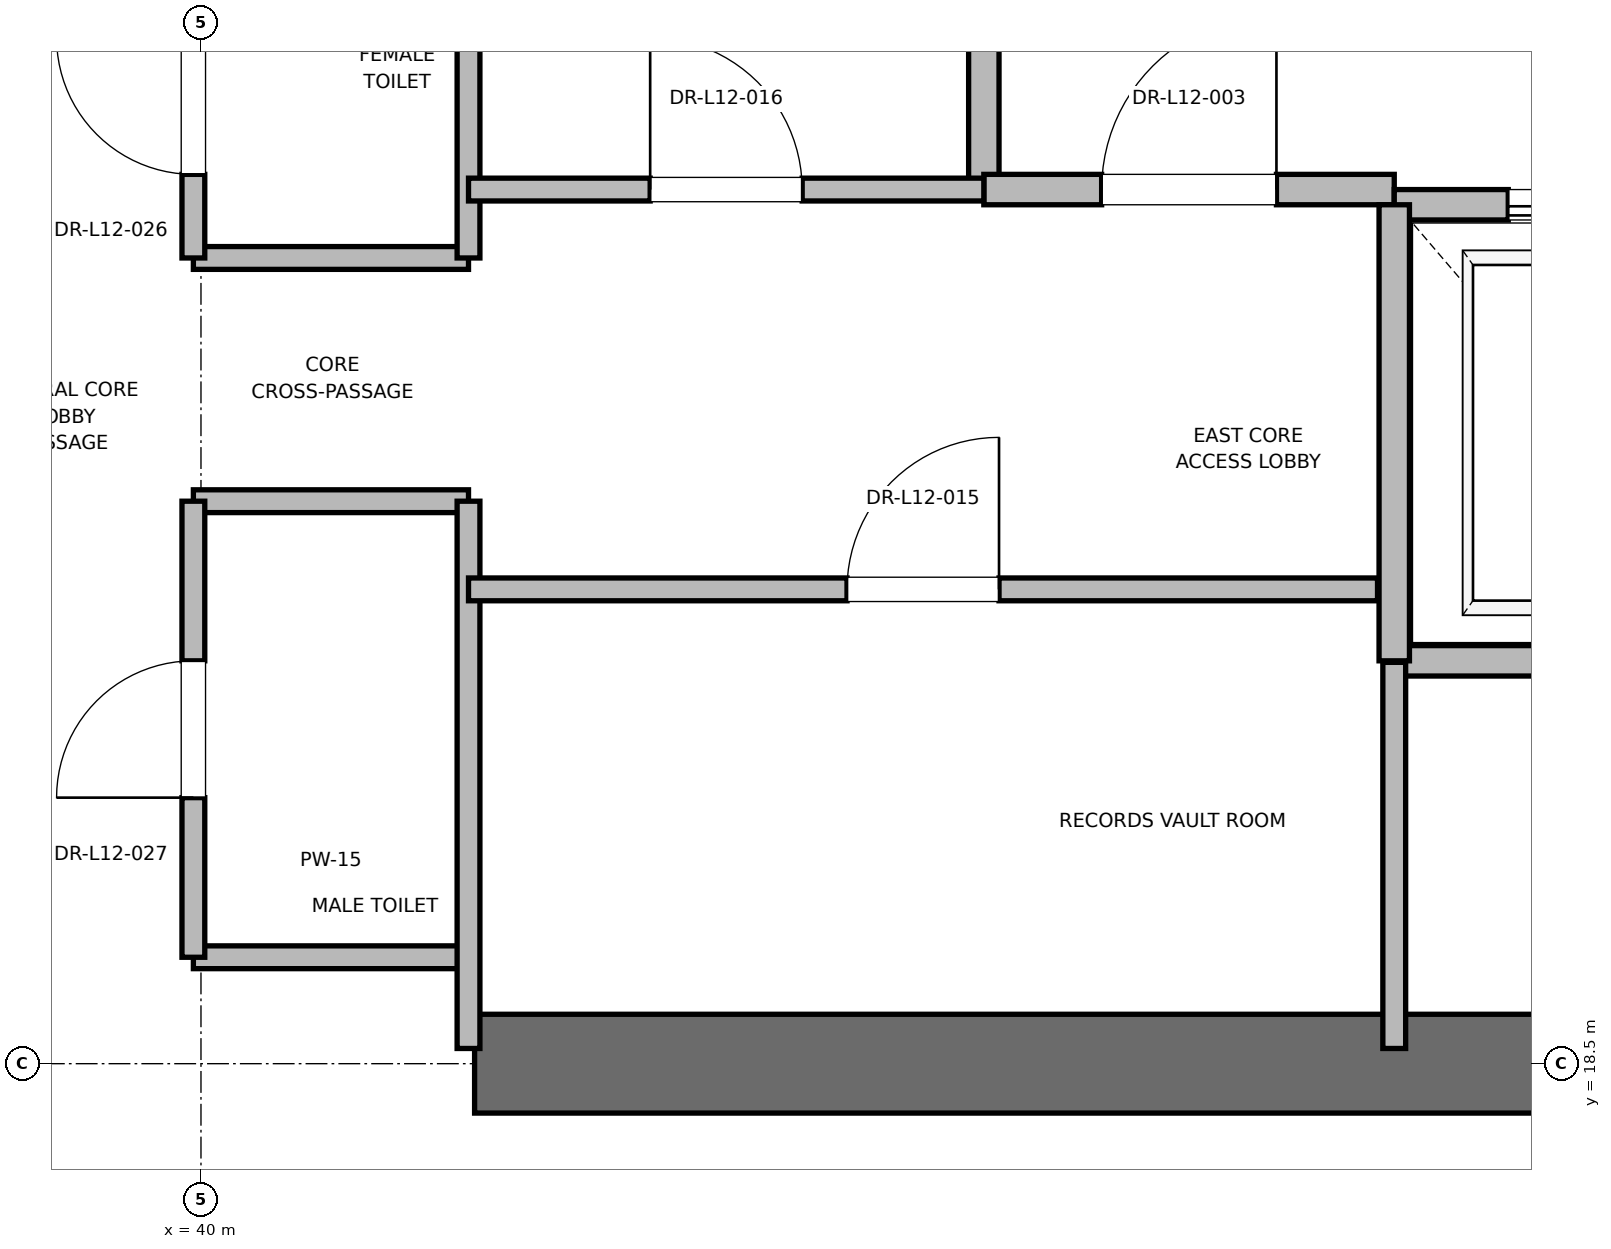
"""IFC4 building model, lengths in metres.
Left out: names, types, materials, properties, quantities, classifications, styles, units other than length and angle.
Written with IfcOpenShell. Run it as: python <this file> out.ifc"""

import sys

from ifc_helpers import new_model, si_unit, direction, frame, frame_2d, origin, place, context, subcontext, project, spatial, rectangle, extrude, element, fill, save


model = new_model("IFC4")
c1 = context("Model", 3, precision=1e-05, world=origin(), true_north=direction((0.0, 1.0)))
c2 = subcontext(c1, "Body", "Model", "MODEL_VIEW")
j1 = project(units=[si_unit("LENGTHUNIT", "METRE"), si_unit("PLANEANGLEUNIT", "RADIAN")], contexts=[c1])
p1 = place(None, origin())
s1 = spatial("IfcSite", under=j1, at=p1, CompositionType="ELEMENT")
p2 = place(p1, origin())
s2 = spatial("IfcBuilding", under=s1, at=p2, CompositionType="ELEMENT")
p3 = place(p2, frame((0.0, 0.0, 55.6)))
s3 = spatial("IfcBuildingStorey", under=s2, at=p3, CompositionType="ELEMENT", Elevation=55.6)
p4 = place(p3, frame((41.8, 18.5, 0.0), z_axis=(0.0, 0.0, 1.0), x_axis=(1.0, 0.0, 0.0)))
e1 = element("IfcWall", 1, at=p4, inside=s3, PredefinedType="SHEAR", context=c2, shape_type="SweptSolid", body=[
    extrude(rectangle(XDim=9.2, YDim=0.65, at=frame_2d((4.6, 0.0))), origin(), (0.0, 0.0, 1.0), 3.76),
])
p5 = place(p3, frame((45.15, 24.25, 0.0), z_axis=(0.0, 0.0, 1.0), x_axis=(0.0, 1.0, 0.0)))
e2 = element("IfcWall", 2, at=p5, inside=s3, PredefinedType="PARTITIONING", context=c2, shape_type="SweptSolid", body=[
    extrude(rectangle(XDim=3.37, YDim=0.2, at=frame_2d((1.685, 0.0))), origin(), (0.0, 0.0, 1.0), 3.76),
])
p6 = place(p3, frame((45.15, 24.25, 0.0), z_axis=(0.0, 0.0, 1.0), x_axis=(1.0, 0.0, 0.0)))
e3 = element("IfcWall", 3, at=p6, inside=s3, PredefinedType="PARTITIONING", context=c2, shape_type="SweptSolid", body=[
    extrude(rectangle(XDim=2.7, YDim=0.2, at=frame_2d((1.35, 0.0))), origin(), (0.0, 0.0, 1.0), 3.76),
])
p7 = place(p6, frame((0.775, 0.0, 0.0)))
e4 = element("IfcOpeningElement", 4, at=p7, cuts=e3, PredefinedType="OPENING", context=c2, shape_type="SweptSolid", body=[
    extrude(rectangle(XDim=1.15, YDim=2.2, at=frame_2d((0.575, 1.1))), frame((0.0, 0.1, 0.0), z_axis=(0.0, -1.0, 0.0), x_axis=(1.0, 0.0, 0.0)), (0.0, 0.0, 1.0), 0.2),
])
p8 = place(p3, frame((47.85, 21.15, 0.0), z_axis=(0.0, 0.0, 1.0), x_axis=(1.0, 0.0, 0.0)))
e5 = element("IfcWall", 5, at=p8, inside=s3, PredefinedType="SOLIDWALL", context=c2, shape_type="SweptSolid", body=[
    extrude(rectangle(XDim=2.6, YDim=0.2, at=frame_2d((1.3, 0.0))), origin(), (0.0, 0.0, 1.0), 3.76),
])
p9 = place(p3, frame((50.45, 24.15, 0.0), z_axis=(0.0, 0.0, 1.0), x_axis=(-1.0, 0.0, 0.0)))
e6 = element("IfcWall", 6, at=p9, inside=s3, PredefinedType="SOLIDWALL", context=c2, shape_type="SweptSolid", body=[
    extrude(rectangle(XDim=2.6, YDim=0.2, at=frame_2d((1.3, 0.0))), origin(), (0.0, 0.0, 1.0), 2.54),
])
p10 = place(p9, frame((0.75, 0.0, 0.0)))
e7 = element("IfcOpeningElement", 7, at=p10, cuts=e6, PredefinedType="OPENING", context=c2, shape_type="SweptSolid", body=[
    extrude(rectangle(XDim=1.1, YDim=2.2, at=frame_2d((0.55, 1.1))), frame((0.0, 0.1, 0.0), z_axis=(0.0, -1.0, 0.0), x_axis=(1.0, 0.0, 0.0)), (0.0, 0.0, 1.0), 0.2),
])
p11 = place(p3, frame((47.85, 24.15, 0.0), z_axis=(0.0, 0.0, 1.0), x_axis=(0.0, -1.0, 0.0)))
e8 = element("IfcWall", 8, at=p11, inside=s3, PredefinedType="SOLIDWALL", context=c2, shape_type="SweptSolid", body=[
    extrude(rectangle(XDim=3.0, YDim=0.2, at=frame_2d((1.5, 0.0))), origin(), (0.0, 0.0, 1.0), 3.76),
])
for number, where, z_axis, x_axis in (
    (9, (39.95, 19.2, 0.0), (0.0, 0.0, 1.0), (1.0, 0.0, 0.0)),
    (10, (39.95, 22.2, 0.0), (0.0, 0.0, 1.0), (1.0, 0.0, 0.0)),
    (11, (39.95, 23.8, 0.0), (0.0, 0.0, 1.0), (1.0, 0.0, 0.0)),
):
    element("IfcWall", number, at=place(p3, frame(where, z_axis=z_axis, x_axis=x_axis)), inside=s3, PredefinedType="PARTITIONING", context=c2, shape_type="SweptSolid", body=[
        extrude(rectangle(XDim=1.81, YDim=0.15, at=frame_2d((0.905, 0.0))), origin(), (0.0, 0.0, 1.0), 2.85),
    ])
p12 = place(p3, frame((41.76, 18.6, 0.0), z_axis=(0.0, 0.0, 1.0), x_axis=(0.0, 1.0, 0.0)))
e12 = element("IfcWall", 12, at=p12, inside=s3, PredefinedType="PARTITIONING", context=c2, shape_type="SweptSolid", body=[
    extrude(rectangle(XDim=3.6, YDim=0.15, at=frame_2d((1.8, 0.0))), origin(), (0.0, 0.0, 1.0), 2.54),
])
p13 = place(p3, frame((41.76, 23.8, 0.0), z_axis=(0.0, 0.0, 1.0), x_axis=(0.0, 1.0, 0.0)))
e13 = element("IfcWall", 13, at=p13, inside=s3, PredefinedType="PARTITIONING", context=c2, shape_type="SweptSolid", body=[
    extrude(rectangle(XDim=4.0, YDim=0.15, at=frame_2d((2.0, 0.0))), origin(), (0.0, 0.0, 1.0), 2.85),
])
p14 = place(p3, frame((39.95, 19.2, 0.0), z_axis=(0.0, 0.0, 1.0), x_axis=(0.0, 1.0, 0.0)))
e14 = element("IfcWall", 14, at=p14, inside=s3, PredefinedType="PARTITIONING", context=c2, shape_type="SweptSolid", body=[
    extrude(rectangle(XDim=3.0, YDim=0.15, at=frame_2d((1.5, 0.0))), origin(), (0.0, 0.0, 1.0), 2.85),
])
p15 = place(p14, frame((1.05, 0.0, 0.0)))
e15 = element("IfcOpeningElement", 15, at=p15, cuts=e14, PredefinedType="OPENING", context=c2, shape_type="SweptSolid", body=[
    extrude(rectangle(XDim=0.9, YDim=2.1, at=frame_2d((0.45, 1.05))), frame((0.0, 0.075, 0.0), z_axis=(0.0, -1.0, 0.0), x_axis=(1.0, 0.0, 0.0)), (0.0, 0.0, 1.0), 0.15),
])
p16 = place(p3, frame((39.95, 23.8, 0.0), z_axis=(0.0, 0.0, 1.0), x_axis=(0.0, 1.0, 0.0)))
e16 = element("IfcWall", 16, at=p16, inside=s3, PredefinedType="PARTITIONING", context=c2, shape_type="SweptSolid", body=[
    extrude(rectangle(XDim=2.0, YDim=0.15, at=frame_2d((1.0, 0.0))), origin(), (0.0, 0.0, 1.0), 2.85),
])
p17 = place(p16, frame((0.55, 0.0, 0.0)))
e17 = element("IfcOpeningElement", 17, at=p17, cuts=e16, PredefinedType="OPENING", context=c2, shape_type="SweptSolid", body=[
    extrude(rectangle(XDim=0.9, YDim=2.1, at=frame_2d((0.45, 1.05))), frame((0.0, 0.075, 0.0), z_axis=(0.0, -1.0, 0.0), x_axis=(1.0, 0.0, 0.0)), (0.0, 0.0, 1.0), 0.15),
])
p18 = place(p3, frame((47.85, 18.6, 0.0), z_axis=(0.0, 0.0, 1.0), x_axis=(0.0, 1.0, 0.0)))
e18 = element("IfcWall", 18, at=p18, inside=s3, PredefinedType="PARTITIONING", context=c2, shape_type="SweptSolid", body=[
    extrude(rectangle(XDim=2.54, YDim=0.15, at=frame_2d((1.27, 0.0))), origin(), (0.0, 0.0, 1.0), 2.85),
])
p19 = place(p3, frame((41.76, 21.62, 0.0), z_axis=(0.0, 0.0, 1.0), x_axis=(1.0, 0.0, 0.0)))
e19 = element("IfcWall", 19, at=p19, inside=s3, PredefinedType="PARTITIONING", context=c2, shape_type="SweptSolid", body=[
    extrude(rectangle(XDim=5.98, YDim=0.15, at=frame_2d((2.99, 0.0))), origin(), (0.0, 0.0, 1.0), 2.85),
])
p20 = place(p19, frame((2.49, 0.0, 0.0)))
e20 = element("IfcOpeningElement", 20, at=p20, cuts=e19, PredefinedType="OPENING", context=c2, shape_type="SweptSolid", body=[
    extrude(rectangle(XDim=1.0, YDim=2.15, at=frame_2d((0.5, 1.075))), frame((0.0, 0.075, 0.0), z_axis=(0.0, -1.0, 0.0), x_axis=(1.0, 0.0, 0.0)), (0.0, 0.0, 1.0), 0.15),
])
p21 = place(p3, frame((41.76, 24.25, 0.0), z_axis=(0.0, 0.0, 1.0), x_axis=(1.0, 0.0, 0.0)))
e21 = element("IfcWall", 21, at=p21, inside=s3, PredefinedType="PARTITIONING", context=c2, shape_type="SweptSolid", body=[
    extrude(rectangle(XDim=3.39, YDim=0.15, at=frame_2d((1.695, 0.0))), origin(), (0.0, 0.0, 1.0), 2.85),
])
p22 = place(p21, frame((1.195, 0.0, 0.0)))
e22 = element("IfcOpeningElement", 22, at=p22, cuts=e21, PredefinedType="OPENING", context=c2, shape_type="SweptSolid", body=[
    extrude(rectangle(XDim=1.0, YDim=2.15, at=frame_2d((0.5, 1.075))), frame((0.0, 0.075, 0.0), z_axis=(0.0, -1.0, 0.0), x_axis=(1.0, 0.0, 0.0)), (0.0, 0.0, 1.0), 0.15),
])
p23 = place(p7, origin())
e23 = element("IfcDoor", 23, at=p23, inside=s3, OperationType="SINGLE_SWING_RIGHT", PredefinedType="DOOR", context=c2, shape_type="SweptSolid", body=[
    extrude(rectangle(XDim=1.15, YDim=2.2, at=frame_2d((0.575, 1.1))), frame((0.0, 0.025, 0.0), z_axis=(0.0, -1.0, 0.0), x_axis=(1.0, 0.0, 0.0)), (0.0, 0.0, 1.0), 0.05),
])
fill(e4, e23)
p24 = place(p10, origin())
e24 = element("IfcDoor", 24, at=p24, inside=s3, OperationType="SLIDING_TO_RIGHT", PredefinedType="DOOR", context=c2, shape_type="SweptSolid", body=[
    extrude(rectangle(XDim=1.1, YDim=2.2, at=frame_2d((0.55, 1.1))), frame((0.0, 0.025, 0.0), z_axis=(0.0, -1.0, 0.0), x_axis=(1.0, 0.0, 0.0)), (0.0, 0.0, 1.0), 0.05),
])
fill(e7, e24)
p25 = place(p15, origin())
e25 = element("IfcDoor", 25, at=p25, inside=s3, OperationType="SINGLE_SWING_LEFT", PredefinedType="DOOR", context=c2, shape_type="SweptSolid", body=[
    extrude(rectangle(XDim=0.9, YDim=2.1, at=frame_2d((0.45, 1.05))), frame((0.0, 0.025, 0.0), z_axis=(0.0, -1.0, 0.0), x_axis=(1.0, 0.0, 0.0)), (0.0, 0.0, 1.0), 0.05),
])
fill(e15, e25)
p26 = place(p17, origin())
e26 = element("IfcDoor", 26, at=p26, inside=s3, OperationType="SINGLE_SWING_RIGHT", PredefinedType="DOOR", context=c2, shape_type="SweptSolid", body=[
    extrude(rectangle(XDim=0.9, YDim=2.1, at=frame_2d((0.45, 1.05))), frame((0.0, 0.025, 0.0), z_axis=(0.0, -1.0, 0.0), x_axis=(1.0, 0.0, 0.0)), (0.0, 0.0, 1.0), 0.05),
])
fill(e17, e26)
p27 = place(p20, origin())
e27 = element("IfcDoor", 27, at=p27, inside=s3, OperationType="SINGLE_SWING_RIGHT", PredefinedType="DOOR", context=c2, shape_type="SweptSolid", body=[
    extrude(rectangle(XDim=1.0, YDim=2.15, at=frame_2d((0.5, 1.075))), frame((0.0, 0.025, 0.0), z_axis=(0.0, -1.0, 0.0), x_axis=(1.0, 0.0, 0.0)), (0.0, 0.0, 1.0), 0.05),
])
fill(e20, e27)
p28 = place(p22, origin())
e28 = element("IfcDoor", 28, at=p28, inside=s3, OperationType="SINGLE_SWING_LEFT", PredefinedType="DOOR", context=c2, shape_type="SweptSolid", body=[
    extrude(rectangle(XDim=1.0, YDim=2.15, at=frame_2d((0.5, 1.075))), frame((0.0, 0.025, 0.0), z_axis=(0.0, -1.0, 0.0), x_axis=(1.0, 0.0, 0.0)), (0.0, 0.0, 1.0), 0.05),
])
fill(e22, e28)
save(model, sys.argv[1])
